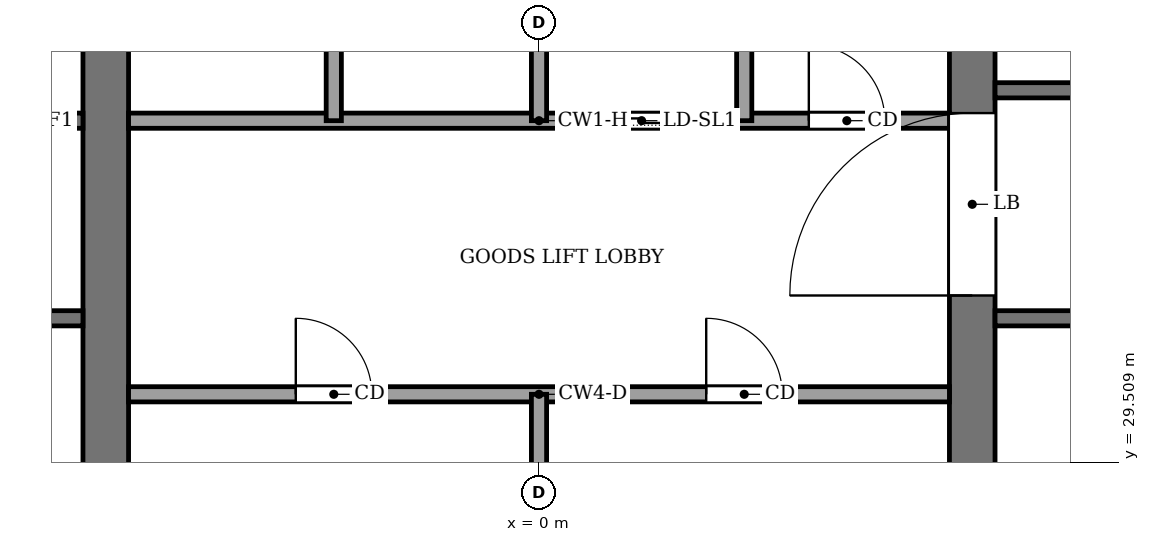
"""IFC4 building model, lengths in metres.
Left out: names, types, materials, properties, quantities, classifications, styles, units other than length and angle.
Written with IfcOpenShell. Run it as: python <this file> out.ifc"""

import sys

from ifc_helpers import new_model, si_unit, direction, frame, frame_2d, origin, place, context, subcontext, project, spatial, rectangle, extrude, element, fill, save


model = new_model("IFC4")
c1 = context("Model", 3, precision=1e-05, world=origin(), true_north=direction((0.0, 1.0)))
c2 = subcontext(c1, "Body", "Model", "MODEL_VIEW")
j1 = project(units=[si_unit("LENGTHUNIT", "METRE"), si_unit("PLANEANGLEUNIT", "RADIAN")], contexts=[c1])
p1 = place(None, origin())
s1 = spatial("IfcSite", under=j1, at=p1, CompositionType="ELEMENT")
p2 = place(p1, origin())
s2 = spatial("IfcBuilding", under=s1, at=p2, CompositionType="ELEMENT")
p3 = place(p2, frame((0.0, 0.0, 222.0)))
s3 = spatial("IfcBuildingStorey", under=s2, at=p3, CompositionType="ELEMENT", Elevation=222.0)
p4 = place(p3, frame((-5.7, 18.4, -0.13), z_axis=(0.0, 0.0, 1.0), x_axis=(0.0, 1.0, 0.0)))
e1 = element("IfcWall", 1, at=p4, inside=s3, PredefinedType="SHEAR", context=c2, shape_type="SweptSolid", body=[
    extrude(rectangle(XDim=19.2, YDim=0.6, at=frame_2d((9.6, 0.0))), origin(), (0.0, 0.0, 1.0), 3.88),
])
p5 = place(p4, frame((8.35, 0.0, 0.13)))
e2 = element("IfcOpeningElement", 2, at=p5, cuts=e1, PredefinedType="OPENING", context=c2, shape_type="SweptSolid", body=[
    extrude(rectangle(XDim=0.9, YDim=2.1, at=frame_2d((0.45, 1.05))), frame((0.0, 0.31, 0.0), z_axis=(0.0, -1.0, 0.0), x_axis=(1.0, 0.0, 0.0)), (0.0, 0.0, 1.0), 0.62),
])
p6 = place(p3, frame((5.7, 18.4, -0.13), z_axis=(0.0, 0.0, 1.0), x_axis=(0.0, 1.0, 0.0)))
e3 = element("IfcWall", 3, at=p6, inside=s3, PredefinedType="SHEAR", context=c2, shape_type="SweptSolid", body=[
    extrude(rectangle(XDim=19.2, YDim=0.6, at=frame_2d((9.6, 0.0))), origin(), (0.0, 0.0, 1.0), 3.88),
])
p7 = place(p6, frame((8.35, 0.0, 0.13)))
e4 = element("IfcOpeningElement", 4, at=p7, cuts=e3, PredefinedType="OPENING", context=c2, shape_type="SweptSolid", body=[
    extrude(rectangle(XDim=0.9, YDim=2.1, at=frame_2d((0.45, 1.05))), frame((0.0, 0.31, 0.0), z_axis=(0.0, -1.0, 0.0), x_axis=(1.0, 0.0, 0.0)), (0.0, 0.0, 1.0), 0.62),
])
p8 = place(p6, frame((13.3, 0.0, 0.13)))
e5 = element("IfcOpeningElement", 5, at=p8, cuts=e3, PredefinedType="OPENING", context=c2, shape_type="SweptSolid", body=[
    extrude(rectangle(XDim=2.4, YDim=2.4, at=frame_2d((1.2, 1.2))), frame((0.0, 0.31, 0.0), z_axis=(0.0, -1.0, 0.0), x_axis=(1.0, 0.0, 0.0)), (0.0, 0.0, 1.0), 0.62),
])
p9 = place(p3, frame((-5.4, 30.4, 0.0), z_axis=(0.0, 0.0, 1.0), x_axis=(1.0, 0.0, 0.0)))
e6 = element("IfcWall", 6, at=p9, inside=s3, PredefinedType="PARTITIONING", context=c2, shape_type="SweptSolid", body=[
    extrude(rectangle(XDim=10.8, YDim=0.2, at=frame_2d((5.4, 0.0))), origin(), (0.0, 0.0, 1.0), 3.75),
])
p10 = place(p9, frame((2.2, 0.0, 0.0)))
e7 = element("IfcOpeningElement", 7, at=p10, cuts=e6, PredefinedType="OPENING", context=c2, shape_type="SweptSolid", body=[
    extrude(rectangle(XDim=1.0, YDim=2.1, at=frame_2d((0.5, 1.05))), frame((0.0, 0.11, 0.0), z_axis=(0.0, -1.0, 0.0), x_axis=(1.0, 0.0, 0.0)), (0.0, 0.0, 1.0), 0.22),
])
p11 = place(p9, frame((7.6, 0.0, 0.0)))
e8 = element("IfcOpeningElement", 8, at=p11, cuts=e6, PredefinedType="OPENING", context=c2, shape_type="SweptSolid", body=[
    extrude(rectangle(XDim=1.0, YDim=2.1, at=frame_2d((0.5, 1.05))), frame((0.0, 0.11, 0.0), z_axis=(0.0, -1.0, 0.0), x_axis=(1.0, 0.0, 0.0)), (0.0, 0.0, 1.0), 0.22),
])
p12 = place(p3, frame((-12.6, 31.4, 0.0), z_axis=(0.0, 0.0, 1.0), x_axis=(1.0, 0.0, 0.0)))
e9 = element("IfcWall", 9, at=p12, inside=s3, PredefinedType="PARTITIONING", context=c2, shape_type="SweptSolid", body=[
    extrude(rectangle(XDim=6.6, YDim=0.2, at=frame_2d((3.3, 0.0))), origin(), (0.0, 0.0, 1.0), 3.75),
])
p13 = place(p12, frame((1.0, 0.0, 0.0)))
e10 = element("IfcOpeningElement", 10, at=p13, cuts=e9, PredefinedType="OPENING", context=c2, shape_type="SweptSolid", body=[
    extrude(rectangle(XDim=1.2, YDim=2.2, at=frame_2d((0.6, 1.1))), frame((0.0, 0.11, 0.0), z_axis=(0.0, -1.0, 0.0), x_axis=(1.0, 0.0, 0.0)), (0.0, 0.0, 1.0), 0.22),
])
p14 = place(p3, frame((6.0, 31.4, 0.0), z_axis=(0.0, 0.0, 1.0), x_axis=(1.0, 0.0, 0.0)))
e11 = element("IfcWall", 11, at=p14, inside=s3, PredefinedType="PARTITIONING", context=c2, shape_type="SweptSolid", body=[
    extrude(rectangle(XDim=6.6, YDim=0.2, at=frame_2d((3.3, 0.0))), origin(), (0.0, 0.0, 1.0), 3.75),
])
p15 = place(p3, frame((-12.6, 34.0, 0.0), z_axis=(0.0, 0.0, 1.0), x_axis=(1.0, 0.0, 0.0)))
e12 = element("IfcWall", 12, at=p15, inside=s3, PredefinedType="PARTITIONING", context=c2, shape_type="SweptSolid", body=[
    extrude(rectangle(XDim=6.6, YDim=0.2, at=frame_2d((3.3, 0.0))), origin(), (0.0, 0.0, 1.0), 3.75),
])
p16 = place(p15, frame((4.7, 0.0, 0.0)))
e13 = element("IfcOpeningElement", 13, at=p16, cuts=e12, PredefinedType="OPENING", context=c2, shape_type="SweptSolid", body=[
    extrude(rectangle(XDim=1.4, YDim=2.2, at=frame_2d((0.7, 1.1))), frame((0.0, 0.11, 0.0), z_axis=(0.0, -1.0, 0.0), x_axis=(1.0, 0.0, 0.0)), (0.0, 0.0, 1.0), 0.22),
])
p17 = place(p15, frame((2.3, 0.0, 0.0)))
e14 = element("IfcOpeningElement", 14, at=p17, cuts=e12, PredefinedType="OPENING", context=c2, shape_type="SweptSolid", body=[
    extrude(rectangle(XDim=1.4, YDim=2.2, at=frame_2d((0.7, 1.1))), frame((0.0, 0.11, 0.0), z_axis=(0.0, -1.0, 0.0), x_axis=(1.0, 0.0, 0.0)), (0.0, 0.0, 1.0), 0.22),
])
p18 = place(p15, frame((0.45, 0.0, 0.0)))
e15 = element("IfcOpeningElement", 15, at=p18, cuts=e12, PredefinedType="OPENING", context=c2, shape_type="SweptSolid", body=[
    extrude(rectangle(XDim=0.9, YDim=2.1, at=frame_2d((0.45, 1.05))), frame((0.0, 0.11, 0.0), z_axis=(0.0, -1.0, 0.0), x_axis=(1.0, 0.0, 0.0)), (0.0, 0.0, 1.0), 0.22),
])
p19 = place(p3, frame((-5.4, 34.0, 0.0), z_axis=(0.0, 0.0, 1.0), x_axis=(1.0, 0.0, 0.0)))
e16 = element("IfcWall", 16, at=p19, inside=s3, PredefinedType="PARTITIONING", context=c2, shape_type="SweptSolid", body=[
    extrude(rectangle(XDim=10.8, YDim=0.2, at=frame_2d((5.4, 0.0))), origin(), (0.0, 0.0, 1.0), 3.75),
])
p20 = place(p19, frame((6.15, 0.0, 0.0)))
e17 = element("IfcOpeningElement", 17, at=p20, cuts=e16, PredefinedType="OPENING", context=c2, shape_type="SweptSolid", body=[
    extrude(rectangle(XDim=1.2, YDim=2.2, at=frame_2d((0.6, 1.1))), frame((0.0, 0.11, 0.0), z_axis=(0.0, -1.0, 0.0), x_axis=(1.0, 0.0, 0.0)), (0.0, 0.0, 1.0), 0.22),
])
p21 = place(p19, frame((8.95, 0.0, 0.0)))
e18 = element("IfcOpeningElement", 18, at=p21, cuts=e16, PredefinedType="OPENING", context=c2, shape_type="SweptSolid", body=[
    extrude(rectangle(XDim=1.0, YDim=2.1, at=frame_2d((0.5, 1.05))), frame((0.0, 0.11, 0.0), z_axis=(0.0, -1.0, 0.0), x_axis=(1.0, 0.0, 0.0)), (0.0, 0.0, 1.0), 0.22),
])
p22 = place(p3, frame((6.0, 34.4, 0.0), z_axis=(0.0, 0.0, 1.0), x_axis=(1.0, 0.0, 0.0)))
e19 = element("IfcWall", 19, at=p22, inside=s3, PredefinedType="PARTITIONING", context=c2, shape_type="SweptSolid", body=[
    extrude(rectangle(XDim=6.6, YDim=0.2, at=frame_2d((3.3, 0.0))), origin(), (0.0, 0.0, 1.0), 3.75),
])
p23 = place(p22, frame((4.8, 0.0, 0.0)))
e20 = element("IfcOpeningElement", 20, at=p23, cuts=e19, PredefinedType="OPENING", context=c2, shape_type="SweptSolid", body=[
    extrude(rectangle(XDim=1.2, YDim=2.2, at=frame_2d((0.6, 1.1))), frame((0.0, 0.11, 0.0), z_axis=(0.0, -1.0, 0.0), x_axis=(1.0, 0.0, 0.0)), (0.0, 0.0, 1.0), 0.22),
])
p24 = place(p3, frame((-2.7, 34.0, 0.0), z_axis=(0.0, 0.0, 1.0), x_axis=(0.0, 1.0, 0.0)))
e21 = element("IfcWall", 21, at=p24, inside=s3, PredefinedType="PARTITIONING", context=c2, shape_type="SweptSolid", body=[
    extrude(rectangle(XDim=3.6, YDim=0.2, at=frame_2d((1.8, 0.0))), origin(), (0.0, 0.0, 1.0), 3.75),
])
p25 = place(p3, frame((0.0, 24.0, 0.0), z_axis=(0.0, 0.0, 1.0), x_axis=(0.0, 1.0, 0.0)))
e22 = element("IfcWall", 22, at=p25, inside=s3, PredefinedType="PARTITIONING", context=c2, shape_type="SweptSolid", body=[
    extrude(rectangle(XDim=6.4, YDim=0.2, at=frame_2d((3.2, 0.0))), origin(), (0.0, 0.0, 1.0), 3.75),
])
for number, where, z_axis, x_axis in (
    (23, (0.0, 34.0, 0.0), (0.0, 0.0, 1.0), (0.0, 1.0, 0.0)),
    (24, (2.7, 34.0, 0.0), (0.0, 0.0, 1.0), (0.0, 1.0, 0.0)),
):
    element("IfcWall", number, at=place(p3, frame(where, z_axis=z_axis, x_axis=x_axis)), inside=s3, PredefinedType="PARTITIONING", context=c2, shape_type="SweptSolid", body=[
        extrude(rectangle(XDim=3.6, YDim=0.2, at=frame_2d((1.8, 0.0))), origin(), (0.0, 0.0, 1.0), 3.75),
    ])
p26 = place(p20, origin())
e25 = element("IfcDoor", 25, at=p26, inside=s3, OperationType="SLIDING_TO_LEFT", PredefinedType="DOOR", context=c2, shape_type="SweptSolid", body=[
    extrude(rectangle(XDim=1.2, YDim=2.2, at=frame_2d((0.6, 1.1))), frame((0.0, 0.025, 0.0), z_axis=(0.0, -1.0, 0.0), x_axis=(1.0, 0.0, 0.0)), (0.0, 0.0, 1.0), 0.05),
])
fill(e17, e25)
p27 = place(p10, origin())
e26 = element("IfcDoor", 26, at=p27, inside=s3, OperationType="SINGLE_SWING_LEFT", PredefinedType="DOOR", context=c2, shape_type="SweptSolid", body=[
    extrude(rectangle(XDim=1.0, YDim=2.1, at=frame_2d((0.5, 1.05))), frame((0.0, 0.025, 0.0), z_axis=(0.0, -1.0, 0.0), x_axis=(1.0, 0.0, 0.0)), (0.0, 0.0, 1.0), 0.05),
])
fill(e7, e26)
p28 = place(p11, origin())
e27 = element("IfcDoor", 27, at=p28, inside=s3, OperationType="SINGLE_SWING_RIGHT", PredefinedType="DOOR", context=c2, shape_type="SweptSolid", body=[
    extrude(rectangle(XDim=1.0, YDim=2.1, at=frame_2d((0.5, 1.05))), frame((0.0, 0.025, 0.0), z_axis=(0.0, -1.0, 0.0), x_axis=(1.0, 0.0, 0.0)), (0.0, 0.0, 1.0), 0.05),
])
fill(e8, e27)
p29 = place(p21, origin())
e28 = element("IfcDoor", 28, at=p29, inside=s3, OperationType="SINGLE_SWING_LEFT", PredefinedType="DOOR", context=c2, shape_type="SweptSolid", body=[
    extrude(rectangle(XDim=1.0, YDim=2.1, at=frame_2d((0.5, 1.05))), frame((0.0, 0.025, 0.0), z_axis=(0.0, -1.0, 0.0), x_axis=(1.0, 0.0, 0.0)), (0.0, 0.0, 1.0), 0.05),
])
fill(e18, e28)
p30 = place(p8, origin())
e29 = element("IfcDoor", 29, at=p30, inside=s3, OperationType="DOUBLE_DOOR_SINGLE_SWING", PredefinedType="DOOR", context=c2, shape_type="SweptSolid", body=[
    extrude(rectangle(XDim=2.4, YDim=2.4, at=frame_2d((1.2, 1.2))), frame((0.0, 0.025, 0.0), z_axis=(0.0, -1.0, 0.0), x_axis=(1.0, 0.0, 0.0)), (0.0, 0.0, 1.0), 0.05),
])
fill(e5, e29)
save(model, sys.argv[1])
